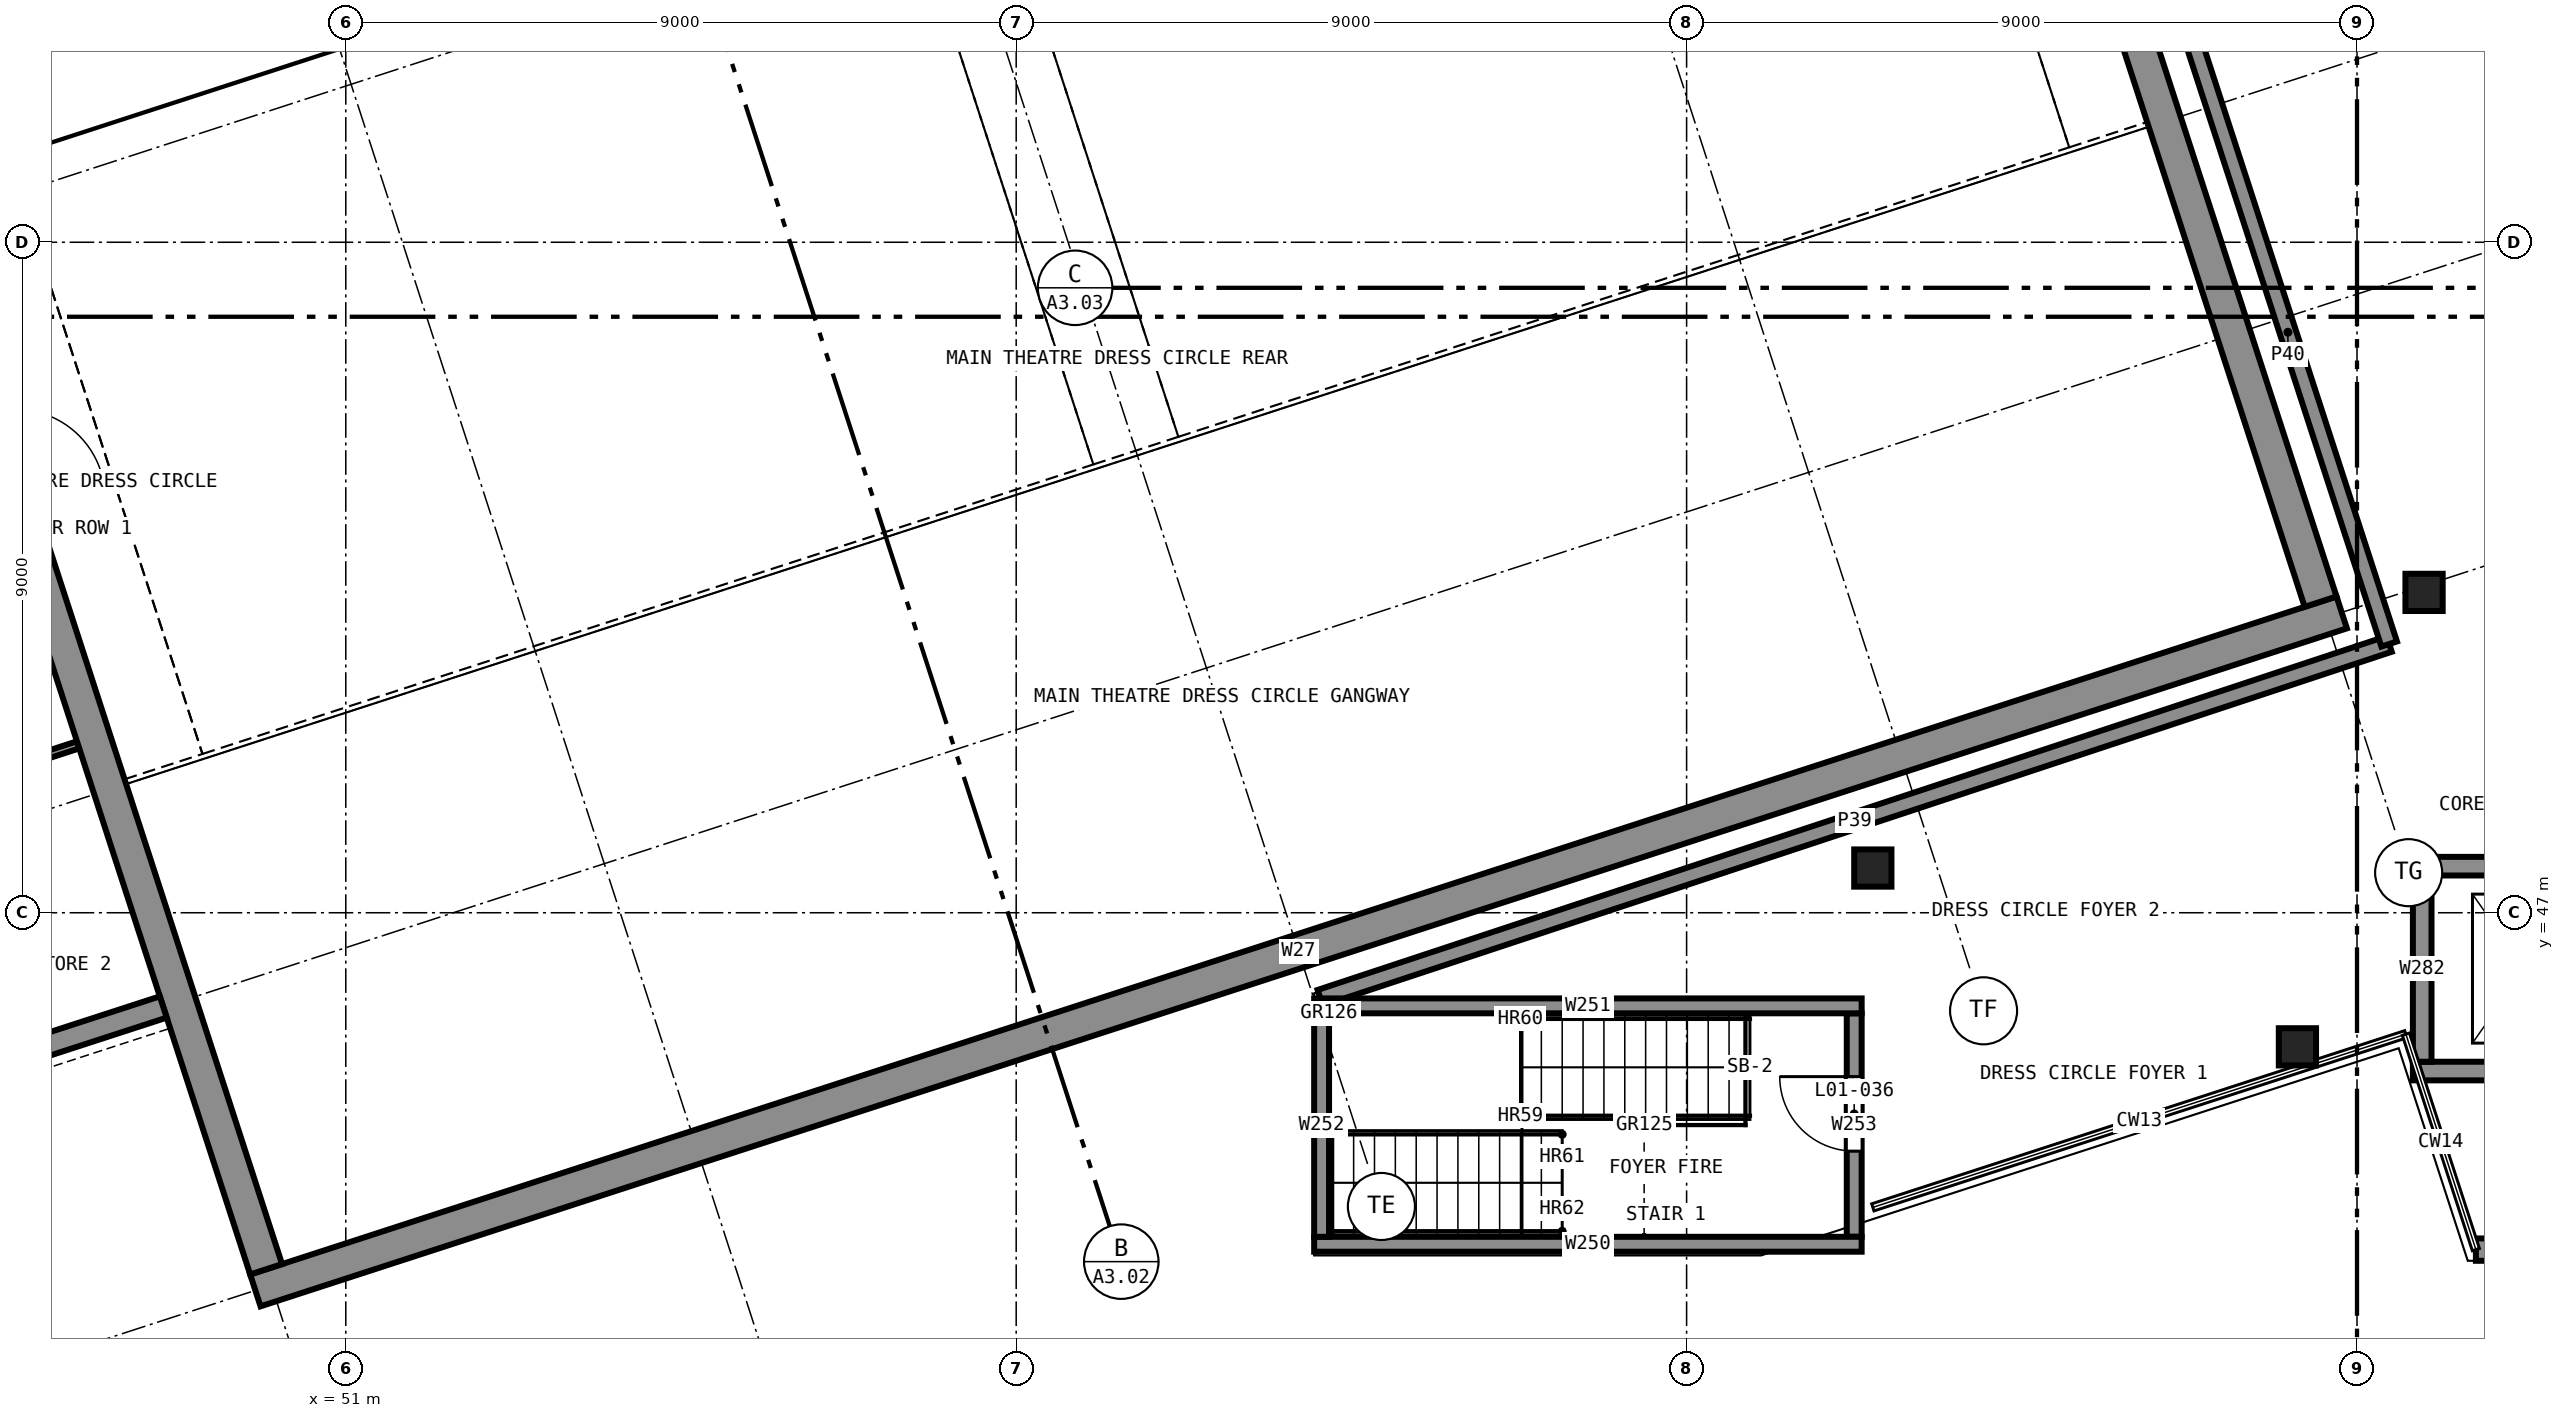
"""IFC4 building model, lengths in metres.
Left out: names, types, materials, properties, quantities, classifications, styles, units other than length and angle.
Written with IfcOpenShell. Run it as: python <this file> out.ifc"""

import sys

from ifc_helpers import new_model, si_unit, direction, frame, frame_2d, origin, origin_2d, place, context, subcontext, project, spatial, rectangle, extrude, element, fill, save


model = new_model("IFC4")
c1 = context("Model", 3, precision=1e-05, world=origin(), true_north=direction((0.0, 1.0)))
c2 = subcontext(c1, "Body", "Model", "MODEL_VIEW")
j1 = project(units=[si_unit("LENGTHUNIT", "METRE"), si_unit("PLANEANGLEUNIT", "RADIAN")], contexts=[c1])
p1 = place(None, origin())
s1 = spatial("IfcSite", under=j1, at=p1, CompositionType="ELEMENT")
p2 = place(p1, origin())
s2 = spatial("IfcBuilding", under=s1, at=p2, CompositionType="ELEMENT")
p3 = place(p2, frame((0.0, 0.0, 5.5)))
s3 = spatial("IfcBuildingStorey", under=s2, at=p3, CompositionType="ELEMENT", Elevation=5.5)
p4 = place(p3, frame((49.786, 41.93, 0.0), z_axis=(0.0, 0.0, 1.0), x_axis=(0.951055937194, 0.309018776661, 0.0)))
e1 = element("IfcWall", 1, at=p4, inside=s3, PredefinedType="SHEAR", context=c2, shape_type="SweptSolid", body=[
    extrude(rectangle(XDim=29.45, YDim=0.45, at=frame_2d((14.725, 0.0))), origin(), (0.0, 0.0, 1.0), 4.0),
])
p5 = place(p3, frame((49.93, 42.214, 0.0), z_axis=(0.0, 0.0, 1.0), x_axis=(-0.309016215614, 0.95105676933, 0.0)))
e2 = element("IfcWall", 2, at=p5, inside=s3, PredefinedType="SHEAR", context=c2, shape_type="SweptSolid", body=[
    extrude(rectangle(XDim=27.975, YDim=0.45, at=frame_2d((13.988, 0.0))), origin(), (0.0, 0.0, 1.0), 4.0),
])
p6 = place(p5, frame((10.875, 0.0, 0.0)))
e3 = element("IfcOpeningElement", 3, at=p6, cuts=e2, PredefinedType="OPENING", context=c2, shape_type="SweptSolid", body=[
    extrude(rectangle(XDim=1.2, YDim=2.1, at=frame_2d((0.6, 1.05))), frame((0.0, 0.235, 0.0), z_axis=(0.0, -1.0, 0.0), x_axis=(1.0, 0.0, 0.0)), (0.0, 0.0, 1.0), 0.47),
])
p7 = place(p3, frame((77.511, 51.176, 0.0), z_axis=(0.0, 0.0, 1.0), x_axis=(-0.309018780445, 0.951055935964, 0.0)))
e4 = element("IfcWall", 4, at=p7, inside=s3, PredefinedType="SHEAR", context=c2, shape_type="SweptSolid", body=[
    extrude(rectangle(XDim=27.975, YDim=0.45, at=frame_2d((13.987, 0.0))), origin(), (0.0, 0.0, 1.0), 4.0),
])
p8 = place(p7, frame((10.875, 0.0, 0.0)))
e5 = element("IfcOpeningElement", 5, at=p8, cuts=e4, PredefinedType="OPENING", context=c2, shape_type="SweptSolid", body=[
    extrude(rectangle(XDim=1.2, YDim=2.1, at=frame_2d((0.6, 1.05))), frame((0.0, 0.235, 0.0), z_axis=(0.0, -1.0, 0.0), x_axis=(1.0, 0.0, 0.0)), (0.0, 0.0, 1.0), 0.47),
])
p9 = place(p3, frame((48.55, 45.735, 0.0), z_axis=(0.0, 0.0, 1.0), x_axis=(-0.951061216338, -0.309002528757, 0.0)))
e6 = element("IfcWall", 6, at=p9, inside=s3, PredefinedType="SOLIDWALL", context=c2, shape_type="SweptSolid", body=[
    extrude(rectangle(XDim=15.925, YDim=0.3, at=frame_2d((7.962, 0.0))), origin(), (0.0, 0.0, 1.0), 4.0),
])
for number, where, z_axis, x_axis in (
    (7, (64.0, 42.55, 0.0), (0.0, 0.0, 1.0), (1.0, 0.0, 0.0)),
    (8, (71.35, 45.75, 0.0), (0.0, 0.0, 1.0), (-1.0, 0.0, 0.0)),
):
    element("IfcWall", number, at=place(p3, frame(where, z_axis=z_axis, x_axis=x_axis)), inside=s3, PredefinedType="SHEAR", context=c2, shape_type="SweptSolid", body=[
        extrude(rectangle(XDim=7.35, YDim=0.2, at=frame_2d((3.675, 0.0))), origin(), (0.0, 0.0, 1.0), 4.0),
    ])
p10 = place(p3, frame((64.1, 45.65, 0.0), z_axis=(0.0, 0.0, 1.0), x_axis=(0.0, -1.0, 0.0)))
e9 = element("IfcWall", 9, at=p10, inside=s3, PredefinedType="SHEAR", context=c2, shape_type="SweptSolid", body=[
    extrude(rectangle(XDim=3.0, YDim=0.2, at=frame_2d((1.5, 0.0))), origin(), (0.0, 0.0, 1.0), 4.0),
])
p11 = place(p3, frame((71.25, 42.65, 0.0), z_axis=(0.0, 0.0, 1.0), x_axis=(0.0, 1.0, 0.0)))
e10 = element("IfcWall", 10, at=p11, inside=s3, PredefinedType="SHEAR", context=c2, shape_type="SweptSolid", body=[
    extrude(rectangle(XDim=3.0, YDim=0.2, at=frame_2d((1.5, 0.0))), origin(), (0.0, 0.0, 1.0), 4.0),
])
p12 = place(p11, frame((1.15, 0.0, 0.0)))
e11 = element("IfcOpeningElement", 11, at=p12, cuts=e10, PredefinedType="OPENING", context=c2, shape_type="SweptSolid", body=[
    extrude(rectangle(XDim=1.0, YDim=2.1, at=frame_2d((0.5, 1.05))), frame((0.0, 0.11, 0.0), z_axis=(0.0, -1.0, 0.0), x_axis=(1.0, 0.0, 0.0)), (0.0, 0.0, 1.0), 0.22),
])
for number, where, z_axis, x_axis in (
    (12, (78.75, 44.875, 0.0), (0.0, 0.0, 1.0), (1.0, 0.0, 0.0)),
    (13, (81.75, 47.625, 0.0), (0.0, 0.0, 1.0), (-1.0, 0.0, 0.0)),
):
    element("IfcWall", number, at=place(p3, frame(where, z_axis=z_axis, x_axis=x_axis)), inside=s3, PredefinedType="SHEAR", context=c2, shape_type="SweptSolid", body=[
        extrude(rectangle(XDim=3.0, YDim=0.25, at=frame_2d((1.5, 0.0))), origin(), (0.0, 0.0, 1.0), 4.0),
    ])
p13 = place(p3, frame((78.875, 47.5, 0.0), z_axis=(0.0, 0.0, 1.0), x_axis=(0.0, -1.0, 0.0)))
e14 = element("IfcWall", 14, at=p13, inside=s3, PredefinedType="SHEAR", context=c2, shape_type="SweptSolid", body=[
    extrude(rectangle(XDim=2.5, YDim=0.25, at=frame_2d((1.25, 0.0))), origin(), (0.0, 0.0, 1.0), 4.0),
])
for number, where, z_axis, x_axis in (
    (15, (77.2, 45.2, 0.0), (0.0, 0.0, 1.0), (1.0, 0.0, 0.0)),
    (16, (71.5, 47.6, 0.0), (0.0, 0.0, 1.0), (1.0, 0.0, 0.0)),
    (17, (78.9, 51.3, 0.0), (0.0, 0.0, 1.0), (1.0, 0.0, 0.0)),
):
    element("IfcColumn", number, at=place(p3, frame(where, z_axis=z_axis, x_axis=x_axis)), inside=s3, PredefinedType="COLUMN", context=c2, shape_type="SweptSolid", body=[
        extrude(rectangle(XDim=0.5, YDim=0.5, at=origin_2d()), origin(), (0.0, 0.0, 1.0), 4.0),
    ])
p14 = place(p3, frame((79.596, 42.478, 0.0), z_axis=(0.0, 0.0, 1.0), x_axis=(1.0, 0.0, 0.0)))
e18 = element("IfcWall", 18, at=p14, inside=s3, PredefinedType="SOLIDWALL", context=c2, shape_type="SweptSolid", body=[
    extrude(rectangle(XDim=2.941, YDim=0.3, at=frame_2d((1.471, 0.0))), origin(), (0.0, 0.0, 1.0), 3.7),
])
p15 = place(p3, frame((64.081, 45.859, 0.0), z_axis=(0.0, 0.0, 1.0), x_axis=(0.949388338269, 0.314104732786, 0.0)))
e19 = element("IfcWall", 19, at=p15, inside=s3, PredefinedType="SOLIDWALL", context=c2, shape_type="SweptSolid", body=[
    extrude(rectangle(XDim=15.116, YDim=0.22, at=frame_2d((7.558, 0.0))), origin(), (0.0, 0.0, 1.0), 3.7),
])
p16 = place(p3, frame((78.432, 50.607, 0.0), z_axis=(0.0, 0.0, 1.0), x_axis=(-0.309027731765, 0.951053027439, 0.0)))
e20 = element("IfcWall", 20, at=p16, inside=s3, PredefinedType="SOLIDWALL", context=c2, shape_type="SweptSolid", body=[
    extrude(rectangle(XDim=8.8, YDim=0.22, at=frame_2d((4.4, 0.0))), origin(), (0.0, 0.0, 1.0), 3.7),
])
p17 = place(p3, frame((44.53, 48.319, 0.0), z_axis=(0.0, 0.0, 1.0), x_axis=(0.951053046121, 0.30902767427, 0.0)))
e21 = element("IfcWall", 21, at=p17, inside=s3, PredefinedType="PARTITIONING", context=c2, shape_type="SweptSolid", body=[
    extrude(rectangle(XDim=3.025, YDim=0.1, at=frame_2d((1.512, 0.0))), origin(), (0.0, 0.0, 1.0), 3.7),
])
p18 = place(p17, frame((0.533, 0.0, 0.0)))
e22 = element("IfcOpeningElement", 22, at=p18, cuts=e21, PredefinedType="OPENING", context=c2, shape_type="SweptSolid", body=[
    extrude(rectangle(XDim=0.9, YDim=2.1, at=frame_2d((0.45, 1.05))), frame((0.0, 0.06, 0.0), z_axis=(0.0, -1.0, 0.0), x_axis=(1.0, 0.0, 0.0)), (0.0, 0.0, 1.0), 0.12),
])
p19 = place(p12, origin())
e23 = element("IfcDoor", 23, at=p19, inside=s3, OperationType="SINGLE_SWING_LEFT", PredefinedType="DOOR", context=c2, shape_type="SweptSolid", body=[
    extrude(rectangle(XDim=1.0, YDim=2.1, at=frame_2d((0.5, 1.05))), frame((0.0, 0.025, 0.0), z_axis=(0.0, -1.0, 0.0), x_axis=(1.0, 0.0, 0.0)), (0.0, 0.0, 1.0), 0.05),
])
fill(e11, e23)
save(model, sys.argv[1])
